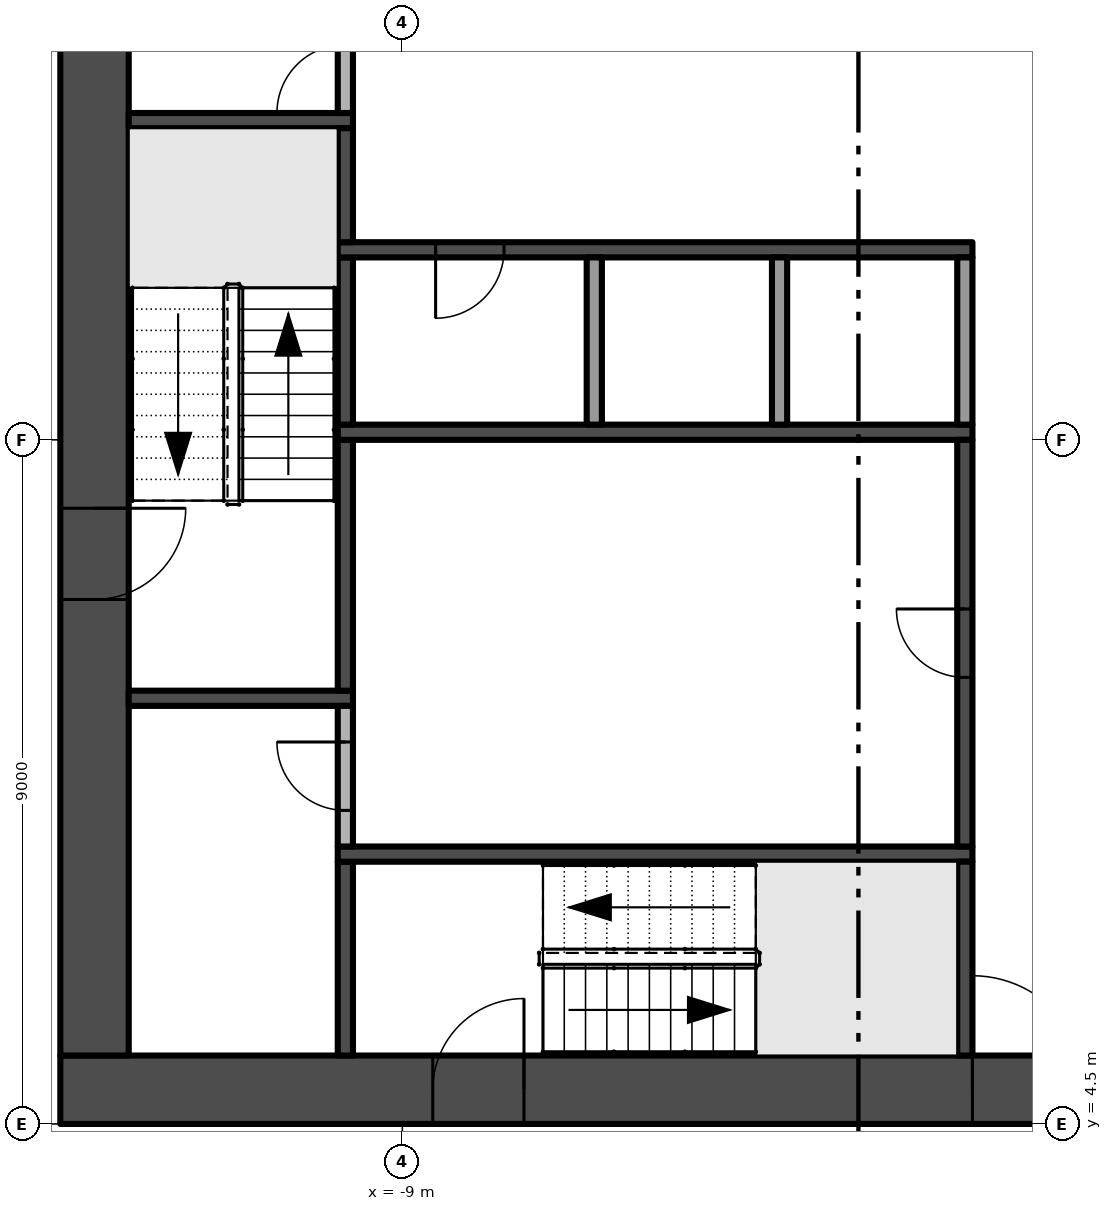
"""IFC4 building model, lengths in metres.
Left out: names, types, materials, properties, quantities, classifications, styles, units other than length and angle.
Written with IfcOpenShell. Run it as: python <this file> out.ifc"""

import sys

from ifc_helpers import new_model, si_unit, direction, frame, frame_2d, origin, place, context, subcontext, project, spatial, rectangle, extrude, element, fill, save


model = new_model("IFC4")
c1 = context("Model", 3, precision=1e-05, world=origin(), true_north=direction((0.0, 1.0)))
c2 = subcontext(c1, "Body", "Model", "MODEL_VIEW")
j1 = project(units=[si_unit("LENGTHUNIT", "METRE"), si_unit("PLANEANGLEUNIT", "RADIAN")], contexts=[c1])
p1 = place(None, origin())
s1 = spatial("IfcSite", under=j1, at=p1, CompositionType="ELEMENT")
p2 = place(p1, origin())
s2 = spatial("IfcBuilding", under=s1, at=p2, CompositionType="ELEMENT")
p3 = place(p2, frame((0.0, 0.0, 69.4)))
s3 = spatial("IfcBuildingStorey", under=s2, at=p3, CompositionType="ELEMENT", Elevation=69.4)
p4 = place(p3, frame((-13.5, 4.95, -0.3), z_axis=(0.0, 0.0, 1.0), x_axis=(1.0, 0.0, 0.0)))
e1 = element("IfcWall", 1, at=p4, inside=s3, PredefinedType="SHEAR", context=c2, shape_type="SweptSolid", body=[
    extrude(rectangle(XDim=27.0, YDim=0.9, at=frame_2d((13.5, 0.0))), origin(), (0.0, 0.0, 1.0), 3.8),
])
p5 = place(p4, frame((12.0, 0.0, 0.3)))
e2 = element("IfcOpeningElement", 2, at=p5, cuts=e1, PredefinedType="OPENING", context=c2, shape_type="SweptSolid", body=[
    extrude(rectangle(XDim=3.0, YDim=2.4, at=frame_2d((1.5, 1.2))), frame((0.0, 0.46, 0.0), z_axis=(0.0, -1.0, 0.0), x_axis=(1.0, 0.0, 0.0)), (0.0, 0.0, 1.0), 0.92),
])
p6 = place(p4, frame((4.9, 0.0, 0.3)))
e3 = element("IfcOpeningElement", 3, at=p6, cuts=e1, PredefinedType="OPENING", context=c2, shape_type="SweptSolid", body=[
    extrude(rectangle(XDim=1.2, YDim=2.2, at=frame_2d((0.6, 1.1))), frame((0.0, 0.46, 0.0), z_axis=(0.0, -1.0, 0.0), x_axis=(1.0, 0.0, 0.0)), (0.0, 0.0, 1.0), 0.92),
])
p7 = place(p4, frame((20.75, 0.0, 0.3)))
e4 = element("IfcOpeningElement", 4, at=p7, cuts=e1, PredefinedType="OPENING", context=c2, shape_type="SweptSolid", body=[
    extrude(rectangle(XDim=1.5, YDim=2.2, at=frame_2d((0.75, 1.1))), frame((0.0, 0.46, 0.0), z_axis=(0.0, -1.0, 0.0), x_axis=(1.0, 0.0, 0.0)), (0.0, 0.0, 1.0), 0.92),
])
p8 = place(p4, frame((17.4, 0.0, 0.3)))
e5 = element("IfcOpeningElement", 5, at=p8, cuts=e1, PredefinedType="OPENING", context=c2, shape_type="SweptSolid", body=[
    extrude(rectangle(XDim=1.2, YDim=2.2, at=frame_2d((0.6, 1.1))), frame((0.0, 0.46, 0.0), z_axis=(0.0, -1.0, 0.0), x_axis=(1.0, 0.0, 0.0)), (0.0, 0.0, 1.0), 0.92),
])
p9 = place(p3, frame((-13.05, 21.6, -0.3), z_axis=(0.0, 0.0, 1.0), x_axis=(0.0, -1.0, 0.0)))
e6 = element("IfcWall", 6, at=p9, inside=s3, PredefinedType="SHEAR", context=c2, shape_type="SweptSolid", body=[
    extrude(rectangle(XDim=16.2, YDim=0.9, at=frame_2d((8.1, 0.0))), origin(), (0.0, 0.0, 1.0), 3.8),
])
p10 = place(p9, frame((9.0, 0.0, 0.3)))
e7 = element("IfcOpeningElement", 7, at=p10, cuts=e6, PredefinedType="OPENING", context=c2, shape_type="SweptSolid", body=[
    extrude(rectangle(XDim=1.2, YDim=2.2, at=frame_2d((0.6, 1.1))), frame((0.0, 0.46, 0.0), z_axis=(0.0, -1.0, 0.0), x_axis=(1.0, 0.0, 0.0)), (0.0, 0.0, 1.0), 0.92),
])
for number, where, z_axis, x_axis in (
    (8, (-12.6, 10.1, 0.0), (0.0, 0.0, 1.0), (1.0, 0.0, 0.0)),
    (9, (-12.6, 17.7, 0.0), (0.0, 0.0, 1.0), (1.0, 0.0, 0.0)),
):
    element("IfcWall", number, at=place(p3, frame(where, z_axis=z_axis, x_axis=x_axis)), inside=s3, PredefinedType="SHEAR", context=c2, shape_type="SweptSolid", body=[
        extrude(rectangle(XDim=2.95, YDim=0.2, at=frame_2d((1.475, 0.0))), origin(), (0.0, 0.0, 1.0), 3.5),
    ])
p11 = place(p3, frame((-9.75, 5.4, 0.0), z_axis=(0.0, 0.0, 1.0), x_axis=(0.0, 1.0, 0.0)))
e10 = element("IfcWall", 10, at=p11, inside=s3, PredefinedType="SHEAR", context=c2, shape_type="SweptSolid", body=[
    extrude(rectangle(XDim=2.55, YDim=0.2, at=frame_2d((1.275, 0.0))), origin(), (0.0, 0.0, 1.0), 3.5),
])
p12 = place(p3, frame((-9.85, 8.05, 0.0), z_axis=(0.0, 0.0, 1.0), x_axis=(1.0, 0.0, 0.0)))
e11 = element("IfcWall", 11, at=p12, inside=s3, PredefinedType="SHEAR", context=c2, shape_type="SweptSolid", body=[
    extrude(rectangle(XDim=8.35, YDim=0.2, at=frame_2d((4.175, 0.0))), origin(), (0.0, 0.0, 1.0), 3.5),
])
p13 = place(p3, frame((-9.75, 8.15, 0.0), z_axis=(0.0, 0.0, 1.0), x_axis=(0.0, 1.0, 0.0)))
e12 = element("IfcWall", 12, at=p13, inside=s3, PredefinedType="PARTITIONING", context=c2, shape_type="SweptSolid", body=[
    extrude(rectangle(XDim=1.85, YDim=0.2, at=frame_2d((0.925, 0.0))), origin(), (0.0, 0.0, 1.0), 3.5),
])
p14 = place(p13, frame((0.475, 0.0, 0.0)))
e13 = element("IfcOpeningElement", 13, at=p14, cuts=e12, PredefinedType="OPENING", context=c2, shape_type="SweptSolid", body=[
    extrude(rectangle(XDim=0.9, YDim=2.1, at=frame_2d((0.45, 1.05))), frame((0.0, 0.11, 0.0), z_axis=(0.0, -1.0, 0.0), x_axis=(1.0, 0.0, 0.0)), (0.0, 0.0, 1.0), 0.22),
])
p15 = place(p3, frame((-9.75, 10.2, 0.0), z_axis=(0.0, 0.0, 1.0), x_axis=(0.0, 1.0, 0.0)))
e14 = element("IfcWall", 14, at=p15, inside=s3, PredefinedType="SHEAR", context=c2, shape_type="SweptSolid", body=[
    extrude(rectangle(XDim=3.3, YDim=0.2, at=frame_2d((1.65, 0.0))), origin(), (0.0, 0.0, 1.0), 3.5),
])
p16 = place(p3, frame((-9.85, 13.6, 0.0), z_axis=(0.0, 0.0, 1.0), x_axis=(1.0, 0.0, 0.0)))
e15 = element("IfcWall", 15, at=p16, inside=s3, PredefinedType="SHEAR", context=c2, shape_type="SweptSolid", body=[
    extrude(rectangle(XDim=8.35, YDim=0.2, at=frame_2d((4.175, 0.0))), origin(), (0.0, 0.0, 1.0), 3.5),
])
p17 = place(p3, frame((-9.75, 13.7, 0.0), z_axis=(0.0, 0.0, 1.0), x_axis=(0.0, 1.0, 0.0)))
e16 = element("IfcWall", 16, at=p17, inside=s3, PredefinedType="SHEAR", context=c2, shape_type="SweptSolid", body=[
    extrude(rectangle(XDim=2.2, YDim=0.2, at=frame_2d((1.1, 0.0))), origin(), (0.0, 0.0, 1.0), 3.5),
])
p18 = place(p3, frame((-1.5, 16.0, 0.0), z_axis=(0.0, 0.0, 1.0), x_axis=(-1.0, 0.0, 0.0)))
e17 = element("IfcWall", 17, at=p18, inside=s3, PredefinedType="SHEAR", context=c2, shape_type="SweptSolid", body=[
    extrude(rectangle(XDim=8.35, YDim=0.2, at=frame_2d((4.175, 0.0))), origin(), (0.0, 0.0, 1.0), 3.5),
])
p19 = place(p18, frame((6.162, 0.0, 0.0)))
e18 = element("IfcOpeningElement", 18, at=p19, cuts=e17, PredefinedType="OPENING", context=c2, shape_type="SweptSolid", body=[
    extrude(rectangle(XDim=0.9, YDim=2.1, at=frame_2d((0.45, 1.05))), frame((0.0, 0.11, 0.0), z_axis=(0.0, -1.0, 0.0), x_axis=(1.0, 0.0, 0.0)), (0.0, 0.0, 1.0), 0.22),
])
p20 = place(p3, frame((-9.75, 16.1, 0.0), z_axis=(0.0, 0.0, 1.0), x_axis=(0.0, 1.0, 0.0)))
e19 = element("IfcWall", 19, at=p20, inside=s3, PredefinedType="SHEAR", context=c2, shape_type="SweptSolid", body=[
    extrude(rectangle(XDim=1.5, YDim=0.2, at=frame_2d((0.75, 0.0))), origin(), (0.0, 0.0, 1.0), 3.5),
])
p21 = place(p3, frame((-9.75, 17.8, 0.0), z_axis=(0.0, 0.0, 1.0), x_axis=(0.0, 1.0, 0.0)))
e20 = element("IfcWall", 20, at=p21, inside=s3, PredefinedType="PARTITIONING", context=c2, shape_type="SweptSolid", body=[
    extrude(rectangle(XDim=1.4, YDim=0.2, at=frame_2d((0.7, 0.0))), origin(), (0.0, 0.0, 1.0), 3.5),
])
p22 = place(p21, origin())
e21 = element("IfcOpeningElement", 21, at=p22, cuts=e20, PredefinedType="OPENING", context=c2, shape_type="SweptSolid", body=[
    extrude(rectangle(XDim=0.9, YDim=2.1, at=frame_2d((0.45, 1.05))), frame((0.0, 0.11, 0.0), z_axis=(0.0, -1.0, 0.0), x_axis=(1.0, 0.0, 0.0)), (0.0, 0.0, 1.0), 0.22),
])
for number, where, z_axis, x_axis in (
    (22, (-6.475, 13.7, 0.0), (0.0, 0.0, 1.0), (0.0, 1.0, 0.0)),
    (23, (-4.037, 13.7, 0.0), (0.0, 0.0, 1.0), (0.0, 1.0, 0.0)),
):
    element("IfcWall", number, at=place(p3, frame(where, z_axis=z_axis, x_axis=x_axis)), inside=s3, PredefinedType="PARTITIONING", context=c2, shape_type="SweptSolid", body=[
        extrude(rectangle(XDim=2.2, YDim=0.2, at=frame_2d((1.1, 0.0))), origin(), (0.0, 0.0, 1.0), 3.5),
    ])
p23 = place(p3, frame((-1.6, 5.4, 0.0), z_axis=(0.0, 0.0, 1.0), x_axis=(0.0, 1.0, 0.0)))
e24 = element("IfcWall", 24, at=p23, inside=s3, PredefinedType="SHEAR", context=c2, shape_type="SweptSolid", body=[
    extrude(rectangle(XDim=2.55, YDim=0.2, at=frame_2d((1.275, 0.0))), origin(), (0.0, 0.0, 1.0), 3.5),
])
p24 = place(p3, frame((-1.6, 8.15, 0.0), z_axis=(0.0, 0.0, 1.0), x_axis=(0.0, 1.0, 0.0)))
e25 = element("IfcWall", 25, at=p24, inside=s3, PredefinedType="SHEAR", context=c2, shape_type="SweptSolid", body=[
    extrude(rectangle(XDim=5.35, YDim=0.2, at=frame_2d((2.675, 0.0))), origin(), (0.0, 0.0, 1.0), 3.5),
])
p25 = place(p24, frame((2.225, 0.0, 0.0)))
e26 = element("IfcOpeningElement", 26, at=p25, cuts=e25, PredefinedType="OPENING", context=c2, shape_type="SweptSolid", body=[
    extrude(rectangle(XDim=0.9, YDim=2.1, at=frame_2d((0.45, 1.05))), frame((0.0, 0.11, 0.0), z_axis=(0.0, -1.0, 0.0), x_axis=(1.0, 0.0, 0.0)), (0.0, 0.0, 1.0), 0.22),
])
p26 = place(p3, frame((-1.6, 13.7, 0.0), z_axis=(0.0, 0.0, 1.0), x_axis=(0.0, 1.0, 0.0)))
e27 = element("IfcWall", 27, at=p26, inside=s3, PredefinedType="PARTITIONING", context=c2, shape_type="SweptSolid", body=[
    extrude(rectangle(XDim=2.2, YDim=0.2, at=frame_2d((1.1, 0.0))), origin(), (0.0, 0.0, 1.0), 3.5),
])
p27 = place(p5, frame((3.0, 0.0, 0.0), z_axis=(0.0, 0.0, 1.0), x_axis=(-1.0, 0.0, 0.0)))
e28 = element("IfcDoor", 28, at=p27, inside=s3, OperationType="DOUBLE_DOOR_SINGLE_SWING", PredefinedType="DOOR", context=c2, shape_type="SweptSolid", body=[
    extrude(rectangle(XDim=3.0, YDim=2.4, at=frame_2d((1.5, 1.2))), frame((0.0, 0.025, 0.0), z_axis=(0.0, -1.0, 0.0), x_axis=(1.0, 0.0, 0.0)), (0.0, 0.0, 1.0), 0.05),
])
fill(e2, e28)
p28 = place(p10, frame((1.2, 0.0, 0.0), z_axis=(0.0, 0.0, 1.0), x_axis=(-1.0, 0.0, 0.0)))
e29 = element("IfcDoor", 29, at=p28, inside=s3, OperationType="SINGLE_SWING_RIGHT", PredefinedType="DOOR", context=c2, shape_type="SweptSolid", body=[
    extrude(rectangle(XDim=1.2, YDim=2.2, at=frame_2d((0.6, 1.1))), frame((0.0, 0.025, 0.0), z_axis=(0.0, -1.0, 0.0), x_axis=(1.0, 0.0, 0.0)), (0.0, 0.0, 1.0), 0.05),
])
fill(e7, e29)
p29 = place(p6, frame((1.2, 0.0, 0.0), z_axis=(0.0, 0.0, 1.0), x_axis=(-1.0, 0.0, 0.0)))
e30 = element("IfcDoor", 30, at=p29, inside=s3, OperationType="SINGLE_SWING_LEFT", PredefinedType="DOOR", context=c2, shape_type="SweptSolid", body=[
    extrude(rectangle(XDim=1.2, YDim=2.2, at=frame_2d((0.6, 1.1))), frame((0.0, 0.025, 0.0), z_axis=(0.0, -1.0, 0.0), x_axis=(1.0, 0.0, 0.0)), (0.0, 0.0, 1.0), 0.05),
])
fill(e3, e30)
p30 = place(p25, origin())
e31 = element("IfcDoor", 31, at=p30, inside=s3, OperationType="SINGLE_SWING_RIGHT", PredefinedType="DOOR", context=c2, shape_type="SweptSolid", body=[
    extrude(rectangle(XDim=0.9, YDim=2.1, at=frame_2d((0.45, 1.05))), frame((0.0, 0.025, 0.0), z_axis=(0.0, -1.0, 0.0), x_axis=(1.0, 0.0, 0.0)), (0.0, 0.0, 1.0), 0.05),
])
fill(e26, e31)
p31 = place(p19, origin())
e32 = element("IfcDoor", 32, at=p31, inside=s3, OperationType="SINGLE_SWING_RIGHT", PredefinedType="DOOR", context=c2, shape_type="SweptSolid", body=[
    extrude(rectangle(XDim=0.9, YDim=2.1, at=frame_2d((0.45, 1.05))), frame((0.0, 0.025, 0.0), z_axis=(0.0, -1.0, 0.0), x_axis=(1.0, 0.0, 0.0)), (0.0, 0.0, 1.0), 0.05),
])
fill(e18, e32)
p32 = place(p22, origin())
e33 = element("IfcDoor", 33, at=p32, inside=s3, OperationType="SINGLE_SWING_LEFT", PredefinedType="DOOR", context=c2, shape_type="SweptSolid", body=[
    extrude(rectangle(XDim=0.9, YDim=2.1, at=frame_2d((0.45, 1.05))), frame((0.0, 0.025, 0.0), z_axis=(0.0, -1.0, 0.0), x_axis=(1.0, 0.0, 0.0)), (0.0, 0.0, 1.0), 0.05),
])
fill(e21, e33)
p33 = place(p14, origin())
e34 = element("IfcDoor", 34, at=p33, inside=s3, OperationType="SINGLE_SWING_RIGHT", PredefinedType="DOOR", context=c2, shape_type="SweptSolid", body=[
    extrude(rectangle(XDim=0.9, YDim=2.1, at=frame_2d((0.45, 1.05))), frame((0.0, 0.025, 0.0), z_axis=(0.0, -1.0, 0.0), x_axis=(1.0, 0.0, 0.0)), (0.0, 0.0, 1.0), 0.05),
])
fill(e13, e34)
save(model, sys.argv[1])
